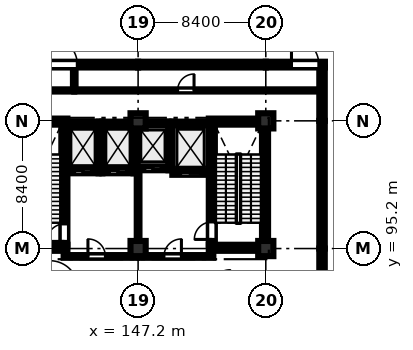
"""IFC4 building model, lengths in metres.
Left out: names, types, materials, properties, quantities, classifications, styles, units other than length and angle.
Written with IfcOpenShell. Run it as: python <this file> out.ifc"""

import sys

from ifc_helpers import new_model, si_unit, direction, frame, frame_2d, origin, origin_2d, place, context, subcontext, project, spatial, rectangle, extrude, element, fill, save


model = new_model("IFC4")
c1 = context("Model", 3, precision=1e-05, world=origin(), true_north=direction((0.0, 1.0)))
c2 = subcontext(c1, "Body", "Model", "MODEL_VIEW")
j1 = project(units=[si_unit("LENGTHUNIT", "METRE"), si_unit("PLANEANGLEUNIT", "RADIAN")], contexts=[c1])
p1 = place(None, origin())
s1 = spatial("IfcSite", under=j1, at=p1, CompositionType="ELEMENT")
p2 = place(p1, origin())
s2 = spatial("IfcBuilding", under=s1, at=p2, CompositionType="ELEMENT")
p3 = place(p2, origin())
s3 = spatial("IfcBuildingStorey", under=s2, at=p3, CompositionType="ELEMENT", Elevation=0.0)
for number, where, z_axis, x_axis in (
    (1, (147.2, 95.2, 0.0), (0.0, 0.0, 1.0), (1.0, 0.0, 0.0)),
    (2, (147.2, 103.6, 0.0), (0.0, 0.0, 1.0), (1.0, 0.0, 0.0)),
    (3, (155.6, 95.2, 0.0), (0.0, 0.0, 1.0), (1.0, 0.0, 0.0)),
    (4, (155.6, 103.6, 0.0), (0.0, 0.0, 1.0), (1.0, 0.0, 0.0)),
):
    element("IfcColumn", number, at=place(p3, frame(where, z_axis=z_axis, x_axis=x_axis)), inside=s3, PredefinedType="COLUMN", context=c2, shape_type="SweptSolid", body=[
        extrude(rectangle(XDim=1.0, YDim=1.0, at=origin_2d()), origin(), (0.0, 0.0, 1.0), 5.18),
    ])
for number, where, z_axis, x_axis in (
    (5, (138.65, 95.25, 0.0), (0.0, 0.0, 1.0), (1.0, 0.0, 0.0)),
    (6, (138.65, 103.55, 0.0), (0.0, 0.0, 1.0), (1.0, 0.0, 0.0)),
):
    element("IfcWall", number, at=place(p3, frame(where, z_axis=z_axis, x_axis=x_axis)), inside=s3, PredefinedType="SHEAR", context=c2, shape_type="SweptSolid", body=[
        extrude(rectangle(XDim=3.9, YDim=0.4, at=frame_2d((1.95, 0.0))), origin(), (0.0, 0.0, 1.0), 5.18),
    ])
p4 = place(p3, frame((142.35, 95.45, 0.0), z_axis=(0.0, 0.0, 1.0), x_axis=(0.0, 1.0, 0.0)))
e7 = element("IfcWall", 7, at=p4, inside=s3, PredefinedType="SHEAR", context=c2, shape_type="SweptSolid", body=[
    extrude(rectangle(XDim=7.9, YDim=0.4, at=frame_2d((3.95, 0.0))), origin(), (0.0, 0.0, 1.0), 5.18),
])
p5 = place(p4, frame((0.22, 0.0, 0.0)))
e8 = element("IfcOpeningElement", 8, at=p5, cuts=e7, PredefinedType="OPENING", context=c2, shape_type="SweptSolid", body=[
    extrude(rectangle(XDim=1.15, YDim=2.15, at=frame_2d((0.575, 1.075))), frame((0.0, 0.21, 0.0), z_axis=(0.0, -1.0, 0.0), x_axis=(1.0, 0.0, 0.0)), (0.0, 0.0, 1.0), 0.42),
])
for number, where, z_axis, x_axis in (
    (9, (151.85, 95.25, 0.0), (0.0, 0.0, 1.0), (1.0, 0.0, 0.0)),
    (10, (151.85, 103.55, 0.0), (0.0, 0.0, 1.0), (1.0, 0.0, 0.0)),
):
    element("IfcWall", number, at=place(p3, frame(where, z_axis=z_axis, x_axis=x_axis)), inside=s3, PredefinedType="SHEAR", context=c2, shape_type="SweptSolid", body=[
        extrude(rectangle(XDim=3.9, YDim=0.4, at=frame_2d((1.95, 0.0))), origin(), (0.0, 0.0, 1.0), 5.18),
    ])
p6 = place(p3, frame((152.05, 95.45, 0.0), z_axis=(0.0, 0.0, 1.0), x_axis=(0.0, 1.0, 0.0)))
e11 = element("IfcWall", 11, at=p6, inside=s3, PredefinedType="SHEAR", context=c2, shape_type="SweptSolid", body=[
    extrude(rectangle(XDim=7.9, YDim=0.4, at=frame_2d((3.95, 0.0))), origin(), (0.0, 0.0, 1.0), 5.18),
])
p7 = place(p6, frame((0.35, 0.0, 0.0)))
e12 = element("IfcOpeningElement", 12, at=p7, cuts=e11, PredefinedType="OPENING", context=c2, shape_type="SweptSolid", body=[
    extrude(rectangle(XDim=1.15, YDim=2.15, at=frame_2d((0.575, 1.075))), frame((0.0, 0.21, 0.0), z_axis=(0.0, -1.0, 0.0), x_axis=(1.0, 0.0, 0.0)), (0.0, 0.0, 1.0), 0.42),
])
p8 = place(p3, frame((155.55, 95.45, 0.0), z_axis=(0.0, 0.0, 1.0), x_axis=(0.0, 1.0, 0.0)))
e13 = element("IfcWall", 13, at=p8, inside=s3, PredefinedType="SHEAR", context=c2, shape_type="SweptSolid", body=[
    extrude(rectangle(XDim=7.9, YDim=0.4, at=frame_2d((3.95, 0.0))), origin(), (0.0, 0.0, 1.0), 5.18),
])
p9 = place(p3, frame((142.55, 100.275, 0.0), z_axis=(0.0, 0.0, 1.0), x_axis=(1.0, 0.0, 0.0)))
e14 = element("IfcWall", 14, at=p9, inside=s3, PredefinedType="SHEAR", context=c2, shape_type="SweptSolid", body=[
    extrude(rectangle(XDim=2.05, YDim=0.25, at=frame_2d((1.025, 0.0))), origin(), (0.0, 0.0, 1.0), 5.18),
])
p10 = place(p9, frame((0.475, 0.0, 0.0)))
e15 = element("IfcOpeningElement", 15, at=p10, cuts=e14, PredefinedType="OPENING", context=c2, shape_type="SweptSolid", body=[
    extrude(rectangle(XDim=1.1, YDim=2.15, at=frame_2d((0.55, 1.075))), frame((0.0, 0.135, 0.0), z_axis=(0.0, -1.0, 0.0), x_axis=(1.0, 0.0, 0.0)), (0.0, 0.0, 1.0), 0.27),
])
p11 = place(p3, frame((142.55, 103.425, 0.0), z_axis=(0.0, 0.0, 1.0), x_axis=(1.0, 0.0, 0.0)))
e16 = element("IfcWall", 16, at=p11, inside=s3, PredefinedType="SHEAR", context=c2, shape_type="SweptSolid", body=[
    extrude(rectangle(XDim=2.05, YDim=0.25, at=frame_2d((1.025, 0.0))), origin(), (0.0, 0.0, 1.0), 5.18),
])
p12 = place(p3, frame((144.725, 100.15, 0.0), z_axis=(0.0, 0.0, 1.0), x_axis=(0.0, 1.0, 0.0)))
e17 = element("IfcWall", 17, at=p12, inside=s3, PredefinedType="SHEAR", context=c2, shape_type="SweptSolid", body=[
    extrude(rectangle(XDim=3.4, YDim=0.25, at=frame_2d((1.7, 0.0))), origin(), (0.0, 0.0, 1.0), 5.18),
])
p13 = place(p3, frame((144.85, 100.275, 0.0), z_axis=(0.0, 0.0, 1.0), x_axis=(1.0, 0.0, 0.0)))
e18 = element("IfcWall", 18, at=p13, inside=s3, PredefinedType="SHEAR", context=c2, shape_type="SweptSolid", body=[
    extrude(rectangle(XDim=2.05, YDim=0.25, at=frame_2d((1.025, 0.0))), origin(), (0.0, 0.0, 1.0), 5.18),
])
p14 = place(p13, frame((0.465, 0.0, 0.0)))
e19 = element("IfcOpeningElement", 19, at=p14, cuts=e18, PredefinedType="OPENING", context=c2, shape_type="SweptSolid", body=[
    extrude(rectangle(XDim=1.12, YDim=2.15, at=frame_2d((0.56, 1.075))), frame((0.0, 0.135, 0.0), z_axis=(0.0, -1.0, 0.0), x_axis=(1.0, 0.0, 0.0)), (0.0, 0.0, 1.0), 0.27),
])
p15 = place(p3, frame((144.85, 103.425, 0.0), z_axis=(0.0, 0.0, 1.0), x_axis=(1.0, 0.0, 0.0)))
e20 = element("IfcWall", 20, at=p15, inside=s3, PredefinedType="SHEAR", context=c2, shape_type="SweptSolid", body=[
    extrude(rectangle(XDim=2.05, YDim=0.25, at=frame_2d((1.025, 0.0))), origin(), (0.0, 0.0, 1.0), 5.18),
])
p16 = place(p3, frame((147.025, 100.15, 0.0), z_axis=(0.0, 0.0, 1.0), x_axis=(0.0, 1.0, 0.0)))
e21 = element("IfcWall", 21, at=p16, inside=s3, PredefinedType="SHEAR", context=c2, shape_type="SweptSolid", body=[
    extrude(rectangle(XDim=3.4, YDim=0.25, at=frame_2d((1.7, 0.0))), origin(), (0.0, 0.0, 1.0), 5.18),
])
p17 = place(p3, frame((147.15, 100.475, 0.0), z_axis=(0.0, 0.0, 1.0), x_axis=(1.0, 0.0, 0.0)))
e22 = element("IfcWall", 22, at=p17, inside=s3, PredefinedType="SHEAR", context=c2, shape_type="SweptSolid", body=[
    extrude(rectangle(XDim=2.05, YDim=0.25, at=frame_2d((1.025, 0.0))), origin(), (0.0, 0.0, 1.0), 5.18),
])
p18 = place(p17, frame((0.495, 0.0, 0.0)))
e23 = element("IfcOpeningElement", 23, at=p18, cuts=e22, PredefinedType="OPENING", context=c2, shape_type="SweptSolid", body=[
    extrude(rectangle(XDim=1.06, YDim=2.15, at=frame_2d((0.53, 1.075))), frame((0.0, 0.135, 0.0), z_axis=(0.0, -1.0, 0.0), x_axis=(1.0, 0.0, 0.0)), (0.0, 0.0, 1.0), 0.27),
])
p19 = place(p3, frame((147.15, 103.425, 0.0), z_axis=(0.0, 0.0, 1.0), x_axis=(1.0, 0.0, 0.0)))
e24 = element("IfcWall", 24, at=p19, inside=s3, PredefinedType="SHEAR", context=c2, shape_type="SweptSolid", body=[
    extrude(rectangle(XDim=2.05, YDim=0.25, at=frame_2d((1.025, 0.0))), origin(), (0.0, 0.0, 1.0), 5.18),
])
p20 = place(p3, frame((149.325, 100.35, 0.0), z_axis=(0.0, 0.0, 1.0), x_axis=(0.0, 1.0, 0.0)))
e25 = element("IfcWall", 25, at=p20, inside=s3, PredefinedType="SHEAR", context=c2, shape_type="SweptSolid", body=[
    extrude(rectangle(XDim=3.2, YDim=0.25, at=frame_2d((1.6, 0.0))), origin(), (0.0, 0.0, 1.0), 5.18),
])
p21 = place(p3, frame((149.45, 100.175, 0.0), z_axis=(0.0, 0.0, 1.0), x_axis=(1.0, 0.0, 0.0)))
e26 = element("IfcWall", 26, at=p21, inside=s3, PredefinedType="SHEAR", context=c2, shape_type="SweptSolid", body=[
    extrude(rectangle(XDim=2.4, YDim=0.25, at=frame_2d((1.2, 0.0))), origin(), (0.0, 0.0, 1.0), 5.18),
])
p22 = place(p21, frame((0.55, 0.0, 0.0)))
e27 = element("IfcOpeningElement", 27, at=p22, cuts=e26, PredefinedType="OPENING", context=c2, shape_type="SweptSolid", body=[
    extrude(rectangle(XDim=1.3, YDim=2.25, at=frame_2d((0.65, 1.125))), frame((0.0, 0.135, 0.0), z_axis=(0.0, -1.0, 0.0), x_axis=(1.0, 0.0, 0.0)), (0.0, 0.0, 1.0), 0.27),
])
p23 = place(p3, frame((149.45, 103.425, 0.0), z_axis=(0.0, 0.0, 1.0), x_axis=(1.0, 0.0, 0.0)))
e28 = element("IfcWall", 28, at=p23, inside=s3, PredefinedType="SHEAR", context=c2, shape_type="SweptSolid", body=[
    extrude(rectangle(XDim=2.4, YDim=0.25, at=frame_2d((1.2, 0.0))), origin(), (0.0, 0.0, 1.0), 5.18),
])
p24 = place(p3, frame((138.8, 107.3, 0.0), z_axis=(0.0, 0.0, 1.0), x_axis=(1.0, 0.0, 0.0)))
e29 = element("IfcWall", 29, at=p24, inside=s3, PredefinedType="SOLIDWALL", context=c2, shape_type="SweptSolid", body=[
    extrude(rectangle(XDim=8.4, YDim=0.38, at=frame_2d((4.2, 0.0))), origin(), (0.0, 0.0, 1.0), 5.18),
])
p25 = place(p24, frame((2.6, 0.0, 0.0)))
e30 = element("IfcOpeningElement", 30, at=p25, cuts=e29, PredefinedType="OPENING", context=c2, shape_type="SweptSolid", body=[
    extrude(rectangle(XDim=1.8, YDim=2.3, at=frame_2d((0.9, 1.15))), frame((0.0, 0.2, 0.0), z_axis=(0.0, -1.0, 0.0), x_axis=(1.0, 0.0, 0.0)), (0.0, 0.0, 1.0), 0.4),
])
p26 = place(p3, frame((147.2, 107.3, 0.0), z_axis=(0.0, 0.0, 1.0), x_axis=(1.0, 0.0, 0.0)))
e31 = element("IfcWall", 31, at=p26, inside=s3, PredefinedType="SOLIDWALL", context=c2, shape_type="SweptSolid", body=[
    extrude(rectangle(XDim=8.4, YDim=0.38, at=frame_2d((4.2, 0.0))), origin(), (0.0, 0.0, 1.0), 5.18),
])
p27 = place(p26, frame((2.4, 0.0, 0.85)))
e32 = element("IfcOpeningElement", 32, at=p27, cuts=e31, PredefinedType="OPENING", context=c2, shape_type="SweptSolid", body=[
    extrude(rectangle(XDim=2.6, YDim=2.4, at=frame_2d((1.3, 1.2))), frame((0.0, 0.2, 0.0), z_axis=(0.0, -1.0, 0.0), x_axis=(1.0, 0.0, 0.0)), (0.0, 0.0, 1.0), 0.4),
])
p28 = place(p3, frame((155.6, 107.3, 0.0), z_axis=(0.0, 0.0, 1.0), x_axis=(1.0, 0.0, 0.0)))
e33 = element("IfcWall", 33, at=p28, inside=s3, PredefinedType="SOLIDWALL", context=c2, shape_type="SweptSolid", body=[
    extrude(rectangle(XDim=3.89, YDim=0.38, at=frame_2d((1.945, 0.0))), origin(), (0.0, 0.0, 1.0), 5.18),
])
p29 = place(p28, frame((1.69, 0.0, 0.0)))
e34 = element("IfcOpeningElement", 34, at=p29, cuts=e33, PredefinedType="OPENING", context=c2, shape_type="SweptSolid", body=[
    extrude(rectangle(XDim=1.8, YDim=2.3, at=frame_2d((0.9, 1.15))), frame((0.0, 0.2, 0.0), z_axis=(0.0, -1.0, 0.0), x_axis=(1.0, 0.0, 0.0)), (0.0, 0.0, 1.0), 0.4),
])
p30 = place(p3, frame((159.3, 95.2, 0.0), z_axis=(0.0, 0.0, 1.0), x_axis=(0.0, -1.0, 0.0)))
e35 = element("IfcWall", 35, at=p30, inside=s3, PredefinedType="STANDARD", context=c2, shape_type="SweptSolid", body=[
    extrude(rectangle(XDim=8.4, YDim=0.36, at=frame_2d((4.2, 0.0))), origin(), (0.0, 0.0, 1.0), 4.78),
])
p31 = place(p30, frame((3.6, 0.0, 1.1)))
e36 = element("IfcOpeningElement", 36, at=p31, cuts=e35, PredefinedType="OPENING", context=c2, shape_type="SweptSolid", body=[
    extrude(rectangle(XDim=1.8, YDim=1.8, at=frame_2d((0.9, 0.9))), frame((0.0, 0.19, 0.0), z_axis=(0.0, -1.0, 0.0), x_axis=(1.0, 0.0, 0.0)), (0.0, 0.0, 1.0), 0.38),
])
p32 = place(p3, frame((159.3, 103.6, 0.0), z_axis=(0.0, 0.0, 1.0), x_axis=(0.0, -1.0, 0.0)))
e37 = element("IfcWall", 37, at=p32, inside=s3, PredefinedType="STANDARD", context=c2, shape_type="SweptSolid", body=[
    extrude(rectangle(XDim=8.4, YDim=0.36, at=frame_2d((4.2, 0.0))), origin(), (0.0, 0.0, 1.0), 4.78),
])
p33 = place(p32, frame((1.15, 0.0, 1.1)))
e38 = element("IfcOpeningElement", 38, at=p33, cuts=e37, PredefinedType="OPENING", context=c2, shape_type="SweptSolid", body=[
    extrude(rectangle(XDim=1.4, YDim=1.4, at=frame_2d((0.7, 0.7))), frame((0.0, 0.19, 0.0), z_axis=(0.0, -1.0, 0.0), x_axis=(1.0, 0.0, 0.0)), (0.0, 0.0, 1.0), 0.38),
])
p34 = place(p3, frame((159.3, 107.11, 0.0), z_axis=(0.0, 0.0, 1.0), x_axis=(0.0, -1.0, 0.0)))
e39 = element("IfcWall", 39, at=p34, inside=s3, PredefinedType="STANDARD", context=c2, shape_type="SweptSolid", body=[
    extrude(rectangle(XDim=3.51, YDim=0.36, at=frame_2d((1.755, 0.0))), origin(), (0.0, 0.0, 1.0), 4.78),
])
p35 = place(p34, frame((1.95, 0.0, 1.1)))
e40 = element("IfcOpeningElement", 40, at=p35, cuts=e39, PredefinedType="OPENING", context=c2, shape_type="SweptSolid", body=[
    extrude(rectangle(XDim=1.2, YDim=1.8, at=frame_2d((0.6, 0.9))), frame((0.0, 0.19, 0.0), z_axis=(0.0, -1.0, 0.0), x_axis=(1.0, 0.0, 0.0)), (0.0, 0.0, 1.0), 0.38),
])
p36 = place(p3, frame((142.3, 94.68, 0.0), z_axis=(0.0, 0.0, 1.0), x_axis=(1.0, 0.0, 0.0)))
e41 = element("IfcWall", 41, at=p36, inside=s3, PredefinedType="STANDARD", context=c2, shape_type="SweptSolid", body=[
    extrude(rectangle(XDim=4.8, YDim=0.18, at=frame_2d((2.4, 0.0))), origin(), (0.0, 0.0, 1.0), 5.18),
])
p37 = place(p36, frame((1.6, 0.0, 0.0)))
e42 = element("IfcOpeningElement", 42, at=p37, cuts=e41, PredefinedType="OPENING", context=c2, shape_type="SweptSolid", body=[
    extrude(rectangle(XDim=1.15, YDim=2.15, at=frame_2d((0.575, 1.075))), frame((0.0, 0.1, 0.0), z_axis=(0.0, -1.0, 0.0), x_axis=(1.0, 0.0, 0.0)), (0.0, 0.0, 1.0), 0.2),
])
p38 = place(p3, frame((147.3, 94.68, 0.0), z_axis=(0.0, 0.0, 1.0), x_axis=(1.0, 0.0, 0.0)))
e43 = element("IfcWall", 43, at=p38, inside=s3, PredefinedType="STANDARD", context=c2, shape_type="SweptSolid", body=[
    extrude(rectangle(XDim=4.85, YDim=0.18, at=frame_2d((2.425, 0.0))), origin(), (0.0, 0.0, 1.0), 5.18),
])
p39 = place(p38, frame((1.6, 0.0, 0.0)))
e44 = element("IfcOpeningElement", 44, at=p39, cuts=e43, PredefinedType="OPENING", context=c2, shape_type="SweptSolid", body=[
    extrude(rectangle(XDim=1.15, YDim=2.15, at=frame_2d((0.575, 1.075))), frame((0.0, 0.1, 0.0), z_axis=(0.0, -1.0, 0.0), x_axis=(1.0, 0.0, 0.0)), (0.0, 0.0, 1.0), 0.2),
])
p40 = place(p3, frame((147.2, 95.75, 0.0), z_axis=(0.0, 0.0, 1.0), x_axis=(0.0, 1.0, 0.0)))
e45 = element("IfcWall", 45, at=p40, inside=s3, PredefinedType="STANDARD", context=c2, shape_type="SweptSolid", body=[
    extrude(rectangle(XDim=4.5, YDim=0.18, at=frame_2d((2.25, 0.0))), origin(), (0.0, 0.0, 1.0), 4.43),
])
p41 = place(p3, frame((122.15, 105.6, 0.0), z_axis=(0.0, 0.0, 1.0), x_axis=(1.0, 0.0, 0.0)))
e46 = element("IfcWall", 46, at=p41, inside=s3, PredefinedType="PARTITIONING", context=c2, shape_type="SweptSolid", body=[
    extrude(rectangle(XDim=20.85, YDim=0.145, at=frame_2d((10.425, 0.0))), origin(), (0.0, 0.0, 1.0), 5.18),
])
p42 = place(p41, frame((3.75, 0.0, 0.0)))
e47 = element("IfcOpeningElement", 47, at=p42, cuts=e46, PredefinedType="OPENING", context=c2, shape_type="SweptSolid", body=[
    extrude(rectangle(XDim=1.85, YDim=2.25, at=frame_2d((0.925, 1.125))), frame((0.0, 0.083, 0.0), z_axis=(0.0, -1.0, 0.0), x_axis=(1.0, 0.0, 0.0)), (0.0, 0.0, 1.0), 0.165),
])
p43 = place(p3, frame((143.0, 105.6, 0.0), z_axis=(0.0, 0.0, 1.0), x_axis=(1.0, 0.0, 0.0)))
e48 = element("IfcWall", 48, at=p43, inside=s3, PredefinedType="PARTITIONING", context=c2, shape_type="SweptSolid", body=[
    extrude(rectangle(XDim=16.12, YDim=0.145, at=frame_2d((8.06, 0.0))), origin(), (0.0, 0.0, 1.0), 5.18),
])
p44 = place(p43, frame((6.8, 0.0, 0.0)))
e49 = element("IfcOpeningElement", 49, at=p44, cuts=e48, PredefinedType="OPENING", context=c2, shape_type="SweptSolid", body=[
    extrude(rectangle(XDim=1.08, YDim=2.15, at=frame_2d((0.54, 1.075))), frame((0.0, 0.083, 0.0), z_axis=(0.0, -1.0, 0.0), x_axis=(1.0, 0.0, 0.0)), (0.0, 0.0, 1.0), 0.165),
])
p45 = place(p3, frame((143.0, 105.6, 0.0), z_axis=(0.0, 0.0, 1.0), x_axis=(0.0, 1.0, 0.0)))
e50 = element("IfcWall", 50, at=p45, inside=s3, PredefinedType="PARTITIONING", context=c2, shape_type="SweptSolid", body=[
    extrude(rectangle(XDim=1.52, YDim=0.172, at=frame_2d((0.76, 0.0))), origin(), (0.0, 0.0, 1.0), 4.78),
])
p46 = place(p25, origin())
e51 = element("IfcDoor", 51, at=p46, inside=s3, OperationType="SINGLE_SWING_LEFT", PredefinedType="DOOR", context=c2, shape_type="SweptSolid", body=[
    extrude(rectangle(XDim=1.8, YDim=2.3, at=frame_2d((0.9, 1.15))), frame((0.0, 0.025, 0.0), z_axis=(0.0, -1.0, 0.0), x_axis=(1.0, 0.0, 0.0)), (0.0, 0.0, 1.0), 0.05),
])
fill(e30, e51)
p47 = place(p27, origin())
e52 = element("IfcWindow", 52, at=p47, inside=s3, PartitioningType="TRIPLE_PANEL_VERTICAL", PredefinedType="WINDOW", context=c2, shape_type="SweptSolid", body=[
    extrude(rectangle(XDim=2.6, YDim=2.4, at=frame_2d((1.3, 1.2))), frame((0.0, 0.03, 0.0), z_axis=(0.0, -1.0, 0.0), x_axis=(1.0, 0.0, 0.0)), (0.0, 0.0, 1.0), 0.06),
])
fill(e32, e52)
p48 = place(p29, origin())
e53 = element("IfcDoor", 53, at=p48, inside=s3, OperationType="SINGLE_SWING_LEFT", PredefinedType="DOOR", context=c2, shape_type="SweptSolid", body=[
    extrude(rectangle(XDim=1.8, YDim=2.3, at=frame_2d((0.9, 1.15))), frame((0.0, 0.025, 0.0), z_axis=(0.0, -1.0, 0.0), x_axis=(1.0, 0.0, 0.0)), (0.0, 0.0, 1.0), 0.05),
])
fill(e34, e53)
p49 = place(p33, origin())
e54 = element("IfcWindow", 54, at=p49, inside=s3, PartitioningType="SINGLE_PANEL", PredefinedType="WINDOW", context=c2, shape_type="SweptSolid", body=[
    extrude(rectangle(XDim=1.4, YDim=1.4, at=frame_2d((0.7, 0.7))), frame((0.0, 0.03, 0.0), z_axis=(0.0, -1.0, 0.0), x_axis=(1.0, 0.0, 0.0)), (0.0, 0.0, 1.0), 0.06),
])
fill(e38, e54)
p50 = place(p35, origin())
e55 = element("IfcWindow", 55, at=p50, inside=s3, PartitioningType="SINGLE_PANEL", PredefinedType="WINDOW", context=c2, shape_type="SweptSolid", body=[
    extrude(rectangle(XDim=1.2, YDim=1.8, at=frame_2d((0.6, 0.9))), frame((0.0, 0.03, 0.0), z_axis=(0.0, -1.0, 0.0), x_axis=(1.0, 0.0, 0.0)), (0.0, 0.0, 1.0), 0.06),
])
fill(e40, e55)
p51 = place(p37, origin())
e56 = element("IfcDoor", 56, at=p51, inside=s3, OperationType="SINGLE_SWING_LEFT", PredefinedType="DOOR", context=c2, shape_type="SweptSolid", body=[
    extrude(rectangle(XDim=1.15, YDim=2.15, at=frame_2d((0.575, 1.075))), frame((0.0, 0.025, 0.0), z_axis=(0.0, -1.0, 0.0), x_axis=(1.0, 0.0, 0.0)), (0.0, 0.0, 1.0), 0.05),
])
fill(e42, e56)
p52 = place(p39, origin())
e57 = element("IfcDoor", 57, at=p52, inside=s3, OperationType="SINGLE_SWING_RIGHT", PredefinedType="DOOR", context=c2, shape_type="SweptSolid", body=[
    extrude(rectangle(XDim=1.15, YDim=2.15, at=frame_2d((0.575, 1.075))), frame((0.0, 0.025, 0.0), z_axis=(0.0, -1.0, 0.0), x_axis=(1.0, 0.0, 0.0)), (0.0, 0.0, 1.0), 0.05),
])
fill(e44, e57)
p53 = place(p44, origin())
e58 = element("IfcDoor", 58, at=p53, inside=s3, OperationType="SINGLE_SWING_RIGHT", PredefinedType="DOOR", context=c2, shape_type="SweptSolid", body=[
    extrude(rectangle(XDim=1.08, YDim=2.15, at=frame_2d((0.54, 1.075))), frame((0.0, 0.025, 0.0), z_axis=(0.0, -1.0, 0.0), x_axis=(1.0, 0.0, 0.0)), (0.0, 0.0, 1.0), 0.05),
])
fill(e49, e58)
p54 = place(p5, origin())
e59 = element("IfcDoor", 59, at=p54, inside=s3, OperationType="SINGLE_SWING_LEFT", PredefinedType="DOOR", context=c2, shape_type="SweptSolid", body=[
    extrude(rectangle(XDim=1.15, YDim=2.15, at=frame_2d((0.575, 1.075))), frame((0.0, 0.025, 0.0), z_axis=(0.0, -1.0, 0.0), x_axis=(1.0, 0.0, 0.0)), (0.0, 0.0, 1.0), 0.05),
])
fill(e8, e59)
p55 = place(p7, origin())
e60 = element("IfcDoor", 60, at=p55, inside=s3, OperationType="SINGLE_SWING_LEFT", PredefinedType="DOOR", context=c2, shape_type="SweptSolid", body=[
    extrude(rectangle(XDim=1.15, YDim=2.15, at=frame_2d((0.575, 1.075))), frame((0.0, 0.025, 0.0), z_axis=(0.0, -1.0, 0.0), x_axis=(1.0, 0.0, 0.0)), (0.0, 0.0, 1.0), 0.05),
])
fill(e12, e60)
p56 = place(p10, origin())
e61 = element("IfcDoor", 61, at=p56, inside=s3, OperationType="SLIDING_TO_LEFT", PredefinedType="DOOR", context=c2, shape_type="SweptSolid", body=[
    extrude(rectangle(XDim=1.1, YDim=2.15, at=frame_2d((0.55, 1.075))), frame((0.0, 0.025, 0.0), z_axis=(0.0, -1.0, 0.0), x_axis=(1.0, 0.0, 0.0)), (0.0, 0.0, 1.0), 0.05),
])
fill(e15, e61)
p57 = place(p14, origin())
e62 = element("IfcDoor", 62, at=p57, inside=s3, OperationType="SLIDING_TO_LEFT", PredefinedType="DOOR", context=c2, shape_type="SweptSolid", body=[
    extrude(rectangle(XDim=1.12, YDim=2.15, at=frame_2d((0.56, 1.075))), frame((0.0, 0.025, 0.0), z_axis=(0.0, -1.0, 0.0), x_axis=(1.0, 0.0, 0.0)), (0.0, 0.0, 1.0), 0.05),
])
fill(e19, e62)
p58 = place(p18, origin())
e63 = element("IfcDoor", 63, at=p58, inside=s3, OperationType="SLIDING_TO_LEFT", PredefinedType="DOOR", context=c2, shape_type="SweptSolid", body=[
    extrude(rectangle(XDim=1.06, YDim=2.15, at=frame_2d((0.53, 1.075))), frame((0.0, 0.025, 0.0), z_axis=(0.0, -1.0, 0.0), x_axis=(1.0, 0.0, 0.0)), (0.0, 0.0, 1.0), 0.05),
])
fill(e23, e63)
p59 = place(p22, origin())
e64 = element("IfcDoor", 64, at=p59, inside=s3, OperationType="SLIDING_TO_LEFT", PredefinedType="DOOR", context=c2, shape_type="SweptSolid", body=[
    extrude(rectangle(XDim=1.3, YDim=2.25, at=frame_2d((0.65, 1.125))), frame((0.0, 0.025, 0.0), z_axis=(0.0, -1.0, 0.0), x_axis=(1.0, 0.0, 0.0)), (0.0, 0.0, 1.0), 0.05),
])
fill(e27, e64)
save(model, sys.argv[1])
